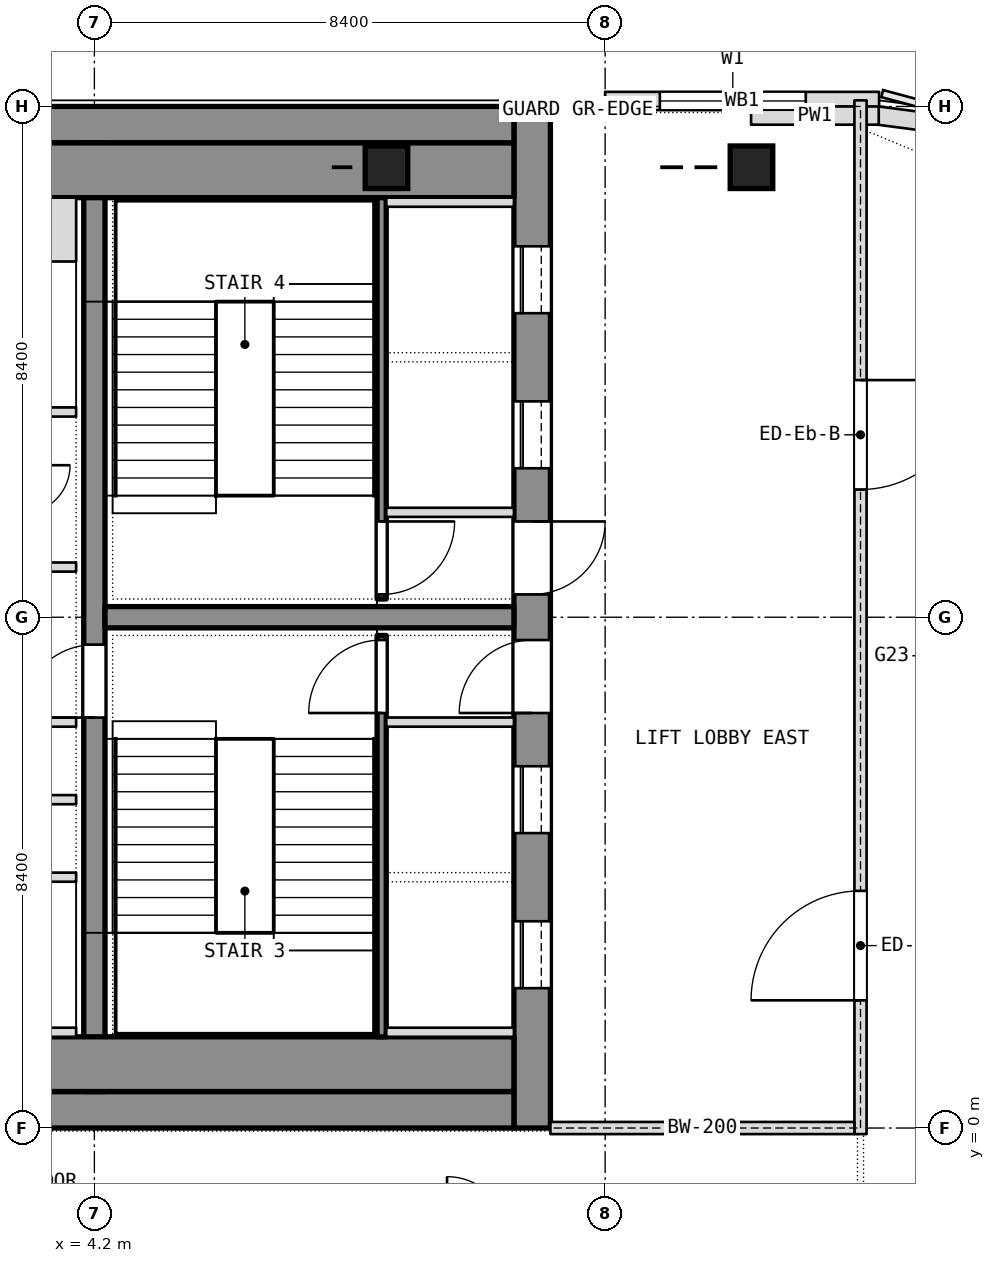
"""IFC4 building model, lengths in metres.
Left out: names, types, materials, properties, quantities, classifications, styles, units other than length and angle.
Written with IfcOpenShell. Run it as: python <this file> out.ifc"""

import sys

from ifc_helpers import new_model, si_unit, direction, frame, frame_2d, origin, place, context, subcontext, project, spatial, rectangle, extrude, element, fill, save


model = new_model("IFC4")
c1 = context("Model", 3, precision=1e-05, world=origin(), true_north=direction((0.0, 1.0)))
c2 = subcontext(c1, "Body", "Model", "MODEL_VIEW")
j1 = project(units=[si_unit("LENGTHUNIT", "METRE"), si_unit("PLANEANGLEUNIT", "RADIAN")], contexts=[c1])
p1 = place(None, origin())
s1 = spatial("IfcSite", under=j1, at=p1, CompositionType="ELEMENT")
p2 = place(p1, origin())
s2 = spatial("IfcBuilding", under=s1, at=p2, CompositionType="ELEMENT")
p3 = place(p2, frame((0.0, 0.0, 277.7)))
s3 = spatial("IfcBuildingStorey", under=s2, at=p3, CompositionType="ELEMENT", Elevation=277.7)
p4 = place(p3, frame((11.4, 0.0, 0.0), z_axis=(0.0, 0.0, 1.0), x_axis=(0.0, 1.0, 0.0)))
e1 = element("IfcWall", 1, at=p4, inside=s3, PredefinedType="SHEAR", context=c2, shape_type="SweptSolid", body=[
    extrude(rectangle(XDim=16.8, YDim=0.6, at=frame_2d((8.4, 0.0))), origin(), (0.0, 0.0, 1.0), 3.6),
])
p5 = place(p4, frame((2.3, 0.0, 0.0)))
e2 = element("IfcOpeningElement", 2, at=p5, cuts=e1, PredefinedType="OPENING", context=c2, shape_type="SweptSolid", body=[
    extrude(rectangle(XDim=1.1, YDim=2.1, at=frame_2d((0.55, 1.05))), frame((0.0, 0.3, 0.0), z_axis=(0.0, -1.0, 0.0), x_axis=(1.0, 0.0, 0.0)), (0.0, 0.0, 1.0), 0.6),
])
p6 = place(p4, frame((4.85, 0.0, 0.0)))
e3 = element("IfcOpeningElement", 3, at=p6, cuts=e1, PredefinedType="OPENING", context=c2, shape_type="SweptSolid", body=[
    extrude(rectangle(XDim=1.1, YDim=2.1, at=frame_2d((0.55, 1.05))), frame((0.0, 0.3, 0.0), z_axis=(0.0, -1.0, 0.0), x_axis=(1.0, 0.0, 0.0)), (0.0, 0.0, 1.0), 0.6),
])
p7 = place(p4, frame((6.825, 0.0, 0.0)))
e4 = element("IfcOpeningElement", 4, at=p7, cuts=e1, PredefinedType="OPENING", context=c2, shape_type="SweptSolid", body=[
    extrude(rectangle(XDim=1.2, YDim=2.1, at=frame_2d((0.6, 1.05))), frame((0.0, 0.3, 0.0), z_axis=(0.0, -1.0, 0.0), x_axis=(1.0, 0.0, 0.0)), (0.0, 0.0, 1.0), 0.6),
])
p8 = place(p4, frame((13.4, 0.0, 0.0)))
e5 = element("IfcOpeningElement", 5, at=p8, cuts=e1, PredefinedType="OPENING", context=c2, shape_type="SweptSolid", body=[
    extrude(rectangle(XDim=1.1, YDim=2.1, at=frame_2d((0.55, 1.05))), frame((0.0, 0.3, 0.0), z_axis=(0.0, -1.0, 0.0), x_axis=(1.0, 0.0, 0.0)), (0.0, 0.0, 1.0), 0.6),
])
p9 = place(p4, frame((10.85, 0.0, 0.0)))
e6 = element("IfcOpeningElement", 6, at=p9, cuts=e1, PredefinedType="OPENING", context=c2, shape_type="SweptSolid", body=[
    extrude(rectangle(XDim=1.1, YDim=2.1, at=frame_2d((0.55, 1.05))), frame((0.0, 0.3, 0.0), z_axis=(0.0, -1.0, 0.0), x_axis=(1.0, 0.0, 0.0)), (0.0, 0.0, 1.0), 0.6),
])
p10 = place(p4, frame((8.775, 0.0, 0.0)))
e7 = element("IfcOpeningElement", 7, at=p10, cuts=e1, PredefinedType="OPENING", context=c2, shape_type="SweptSolid", body=[
    extrude(rectangle(XDim=1.2, YDim=2.1, at=frame_2d((0.6, 1.05))), frame((0.0, 0.3, 0.0), z_axis=(0.0, -1.0, 0.0), x_axis=(1.0, 0.0, 0.0)), (0.0, 0.0, 1.0), 0.6),
])
for number, where, z_axis, x_axis in (
    (8, (-11.1, 0.3, 0.0), (0.0, 0.0, 1.0), (1.0, 0.0, 0.0)),
    (9, (-11.1, 16.5, 0.0), (0.0, 0.0, 1.0), (1.0, 0.0, 0.0)),
):
    element("IfcWall", number, at=place(p3, frame(where, z_axis=z_axis, x_axis=x_axis)), inside=s3, PredefinedType="SHEAR", context=c2, shape_type="SweptSolid", body=[
        extrude(rectangle(XDim=22.2, YDim=0.6, at=frame_2d((11.1, 0.0))), origin(), (0.0, 0.0, 1.0), 3.6),
    ])
p11 = place(p3, frame((4.2, 0.6, 0.0), z_axis=(0.0, 0.0, 1.0), x_axis=(0.0, 1.0, 0.0)))
e10 = element("IfcWall", 10, at=p11, inside=s3, PredefinedType="SHEAR", context=c2, shape_type="SweptSolid", body=[
    extrude(rectangle(XDim=15.6, YDim=0.35, at=frame_2d((7.8, 0.0))), origin(), (0.0, 0.0, 1.0), 3.6),
])
p12 = place(p11, frame((6.15, 0.0, 0.0)))
e11 = element("IfcOpeningElement", 11, at=p12, cuts=e10, PredefinedType="OPENING", context=c2, shape_type="SweptSolid", body=[
    extrude(rectangle(XDim=1.2, YDim=2.1, at=frame_2d((0.6, 1.05))), frame((0.0, 0.175, 0.0), z_axis=(0.0, -1.0, 0.0), x_axis=(1.0, 0.0, 0.0)), (0.0, 0.0, 1.0), 0.35),
])
p13 = place(p3, frame((4.375, 8.4, 0.0), z_axis=(0.0, 0.0, 1.0), x_axis=(1.0, 0.0, 0.0)))
e12 = element("IfcWall", 12, at=p13, inside=s3, PredefinedType="SHEAR", context=c2, shape_type="SweptSolid", body=[
    extrude(rectangle(XDim=6.725, YDim=0.35, at=frame_2d((3.363, 0.0))), origin(), (0.0, 0.0, 1.0), 3.6),
])
p14 = place(p3, frame((17.106, 16.89, 0.0), z_axis=(0.0, 0.0, 1.0), x_axis=(-1.0, 0.0, 0.0)))
e13 = element("IfcWall", 13, at=p14, inside=s3, PredefinedType="NOTDEFINED", context=c2, shape_type="SweptSolid", body=[
    extrude(rectangle(XDim=4.506, YDim=0.3, at=frame_2d((2.253, 0.0))), origin(), (0.0, 0.0, 1.0), 3.6),
])
p15 = place(p14, frame((1.206, 0.0, 0.9)))
e14 = element("IfcOpeningElement", 14, at=p15, cuts=e13, PredefinedType="OPENING", context=c2, shape_type="SweptSolid", body=[
    extrude(rectangle(XDim=2.4, YDim=2.1, at=frame_2d((1.2, 1.05))), frame((0.0, 0.15, 0.0), z_axis=(0.0, -1.0, 0.0), x_axis=(1.0, 0.0, 0.0)), (0.0, 0.0, 1.0), 0.3),
])
p16 = place(p3, frame((17.08, 16.651, 3.6), z_axis=(0.0, 0.0, 1.0), x_axis=(0.991453765022, -0.130458544462, 0.0)))
e15 = element("IfcWall", 15, at=p16, inside=s3, PredefinedType="PARAPET", context=c2, shape_type="SweptSolid", body=[
    extrude(rectangle(XDim=1.566, YDim=0.3, at=frame_2d((0.783, 0.0))), origin(), (0.0, 0.0, 1.0), 1.1),
])
p17 = place(p3, frame((15.0, 16.65, 3.6), z_axis=(0.0, 0.0, 1.0), x_axis=(1.0, 0.0, 0.0)))
e16 = element("IfcWall", 16, at=p17, inside=s3, PredefinedType="PARAPET", context=c2, shape_type="SweptSolid", body=[
    extrude(rectangle(XDim=2.1, YDim=0.3, at=frame_2d((1.05, 0.0))), origin(), (0.0, 0.0, 1.0), 1.1),
])
for number, where, z_axis, x_axis in (
    (17, (-11.1, 1.05, 0.0), (0.0, 0.0, 1.0), (1.0, 0.0, 0.0)),
    (18, (-11.1, 15.75, 0.0), (0.0, 0.0, 1.0), (1.0, 0.0, 0.0)),
):
    element("IfcWall", number, at=place(p3, frame(where, z_axis=z_axis, x_axis=x_axis)), inside=s3, PredefinedType="PARTITIONING", context=c2, shape_type="SweptSolid", body=[
        extrude(rectangle(XDim=22.2, YDim=0.9, at=frame_2d((11.1, 0.0))), origin(), (0.0, 0.0, 1.0), 3.34),
    ])
p18 = place(p3, frame((8.925, 1.5, 0.0), z_axis=(0.0, 0.0, 1.0), x_axis=(0.0, 1.0, 0.0)))
e19 = element("IfcWall", 19, at=p18, inside=s3, PredefinedType="SHEAR", context=c2, shape_type="SweptSolid", body=[
    extrude(rectangle(XDim=6.6, YDim=0.15, at=frame_2d((3.3, 0.0))), origin(), (0.0, 0.0, 1.0), 3.34),
])
p19 = place(p18, frame((5.325, 0.0, 0.0)))
e20 = element("IfcOpeningElement", 20, at=p19, cuts=e19, PredefinedType="OPENING", context=c2, shape_type="SweptSolid", body=[
    extrude(rectangle(XDim=1.2, YDim=2.1, at=frame_2d((0.6, 1.05))), frame((0.0, 0.075, 0.0), z_axis=(0.0, -1.0, 0.0), x_axis=(1.0, 0.0, 0.0)), (0.0, 0.0, 1.0), 0.15),
])
for number, where, z_axis, x_axis in (
    (21, (9.0, 6.675, 0.0), (0.0, 0.0, 1.0), (1.0, 0.0, 0.0)),
    (22, (9.0, 1.575, 0.0), (0.0, 0.0, 1.0), (1.0, 0.0, 0.0)),
):
    element("IfcWall", number, at=place(p3, frame(where, z_axis=z_axis, x_axis=x_axis)), inside=s3, PredefinedType="SHEAR", context=c2, shape_type="SweptSolid", body=[
        extrude(rectangle(XDim=2.1, YDim=0.15, at=frame_2d((1.05, 0.0))), origin(), (0.0, 0.0, 1.0), 3.6),
    ])
p20 = place(p3, frame((8.925, 8.7, 0.0), z_axis=(0.0, 0.0, 1.0), x_axis=(0.0, 1.0, 0.0)))
e23 = element("IfcWall", 23, at=p20, inside=s3, PredefinedType="SHEAR", context=c2, shape_type="SweptSolid", body=[
    extrude(rectangle(XDim=6.6, YDim=0.15, at=frame_2d((3.3, 0.0))), origin(), (0.0, 0.0, 1.0), 3.34),
])
p21 = place(p20, frame((0.075, 0.0, 0.0)))
e24 = element("IfcOpeningElement", 24, at=p21, cuts=e23, PredefinedType="OPENING", context=c2, shape_type="SweptSolid", body=[
    extrude(rectangle(XDim=1.2, YDim=2.1, at=frame_2d((0.6, 1.05))), frame((0.0, 0.075, 0.0), z_axis=(0.0, -1.0, 0.0), x_axis=(1.0, 0.0, 0.0)), (0.0, 0.0, 1.0), 0.15),
])
for number, where, z_axis, x_axis in (
    (25, (9.0, 10.125, 0.0), (0.0, 0.0, 1.0), (1.0, 0.0, 0.0)),
    (26, (9.0, 15.225, 0.0), (0.0, 0.0, 1.0), (1.0, 0.0, 0.0)),
):
    element("IfcWall", number, at=place(p3, frame(where, z_axis=z_axis, x_axis=x_axis)), inside=s3, PredefinedType="SHEAR", context=c2, shape_type="SweptSolid", body=[
        extrude(rectangle(XDim=2.1, YDim=0.15, at=frame_2d((1.05, 0.0))), origin(), (0.0, 0.0, 1.0), 3.6),
    ])
p22 = place(p3, frame((-3.9, 4.125, 0.0), z_axis=(0.0, 0.0, 1.0), x_axis=(1.0, 0.0, 0.0)))
e27 = element("IfcWall", 27, at=p22, inside=s3, PredefinedType="PARTITIONING", context=c2, shape_type="SweptSolid", body=[
    extrude(rectangle(XDim=7.8, YDim=0.15, at=frame_2d((3.9, 0.0))), origin(), (0.0, 0.0, 1.0), 3.34),
])
p23 = place(p22, frame((3.75, 0.0, 0.0)))
e28 = element("IfcOpeningElement", 28, at=p23, cuts=e27, PredefinedType="OPENING", context=c2, shape_type="SweptSolid", body=[
    extrude(rectangle(XDim=1.2, YDim=2.1, at=frame_2d((0.6, 1.05))), frame((0.0, 0.075, 0.0), z_axis=(0.0, -1.0, 0.0), x_axis=(1.0, 0.0, 0.0)), (0.0, 0.0, 1.0), 0.15),
])
p24 = place(p3, frame((-3.9, 11.775, 0.0), z_axis=(0.0, 0.0, 1.0), x_axis=(1.0, 0.0, 0.0)))
e29 = element("IfcWall", 29, at=p24, inside=s3, PredefinedType="PARTITIONING", context=c2, shape_type="SweptSolid", body=[
    extrude(rectangle(XDim=7.8, YDim=0.15, at=frame_2d((3.9, 0.0))), origin(), (0.0, 0.0, 1.0), 3.34),
])
p25 = place(p24, frame((3.3, 0.0, 0.0)))
e30 = element("IfcOpeningElement", 30, at=p25, cuts=e29, PredefinedType="OPENING", context=c2, shape_type="SweptSolid", body=[
    extrude(rectangle(XDim=1.2, YDim=2.1, at=frame_2d((0.6, 1.05))), frame((0.0, 0.075, 0.0), z_axis=(0.0, -1.0, 0.0), x_axis=(1.0, 0.0, 0.0)), (0.0, 0.0, 1.0), 0.15),
])
p26 = place(p3, frame((1.65, 1.575, 0.0), z_axis=(0.0, 0.0, 1.0), x_axis=(1.0, 0.0, 0.0)))
e31 = element("IfcWall", 31, at=p26, inside=s3, PredefinedType="SHEAR", context=c2, shape_type="SweptSolid", body=[
    extrude(rectangle(XDim=2.25, YDim=0.15, at=frame_2d((1.125, 0.0))), origin(), (0.0, 0.0, 1.0), 3.6),
])
p27 = place(p3, frame((1.65, 14.775, 0.0), z_axis=(0.0, 0.0, 1.0), x_axis=(1.0, 0.0, 0.0)))
e32 = element("IfcWall", 32, at=p27, inside=s3, PredefinedType="SHEAR", context=c2, shape_type="SweptSolid", body=[
    extrude(rectangle(XDim=2.25, YDim=1.05, at=frame_2d((1.125, 0.0))), origin(), (0.0, 0.0, 1.0), 3.6),
])
for number, where, z_axis, x_axis in (
    (33, (1.65, 6.675, 0.0), (0.0, 0.0, 1.0), (1.0, 0.0, 0.0)),
    (34, (1.65, 9.225, 0.0), (0.0, 0.0, 1.0), (1.0, 0.0, 0.0)),
):
    element("IfcWall", number, at=place(p3, frame(where, z_axis=z_axis, x_axis=x_axis)), inside=s3, PredefinedType="PARTITIONING", context=c2, shape_type="SweptSolid", body=[
        extrude(rectangle(XDim=2.25, YDim=0.15, at=frame_2d((1.125, 0.0))), origin(), (0.0, 0.0, 1.0), 3.34),
    ])
p28 = place(p3, frame((1.8, 5.4, 0.0), z_axis=(0.0, 0.0, 1.0), x_axis=(1.0, 0.0, 0.0)))
e35 = element("IfcWall", 35, at=p28, inside=s3, PredefinedType="PARTITIONING", context=c2, shape_type="SweptSolid", body=[
    extrude(rectangle(XDim=2.1, YDim=0.15, at=frame_2d((1.05, 0.0))), origin(), (0.0, 0.0, 1.0), 3.34),
])
p29 = place(p3, frame((16.8, -0.1, 0.0), z_axis=(0.0, 0.0, 1.0), x_axis=(0.0, 1.0, 0.0)))
e36 = element("IfcWall", 36, at=p29, inside=s3, PredefinedType="PARTITIONING", context=c2, shape_type="SweptSolid", body=[
    extrude(rectangle(XDim=17.0, YDim=0.2, at=frame_2d((8.5, 0.0))), origin(), (0.0, 0.0, 1.0), 3.34),
])
p30 = place(p29, frame((2.2, 0.0, 0.0)))
e37 = element("IfcOpeningElement", 37, at=p30, cuts=e36, PredefinedType="OPENING", context=c2, shape_type="SweptSolid", body=[
    extrude(rectangle(XDim=1.8, YDim=2.1, at=frame_2d((0.9, 1.05))), frame((0.0, 0.1, 0.0), z_axis=(0.0, -1.0, 0.0), x_axis=(1.0, 0.0, 0.0)), (0.0, 0.0, 1.0), 0.2),
])
p31 = place(p29, frame((10.6, 0.0, 0.0)))
e38 = element("IfcOpeningElement", 38, at=p31, cuts=e36, PredefinedType="OPENING", context=c2, shape_type="SweptSolid", body=[
    extrude(rectangle(XDim=1.8, YDim=2.1, at=frame_2d((0.9, 1.05))), frame((0.0, 0.1, 0.0), z_axis=(0.0, -1.0, 0.0), x_axis=(1.0, 0.0, 0.0)), (0.0, 0.0, 1.0), 0.2),
])
p32 = place(p3, frame((11.7, 0.0, 0.0), z_axis=(0.0, 0.0, 1.0), x_axis=(1.0, 0.0, 0.0)))
e39 = element("IfcWall", 39, at=p32, inside=s3, PredefinedType="PARTITIONING", context=c2, shape_type="SweptSolid", body=[
    extrude(rectangle(XDim=5.0, YDim=0.2, at=frame_2d((2.5, 0.0))), origin(), (0.0, 0.0, 1.0), 3.0),
])
p33 = place(p15, origin())
e40 = element("IfcWindow", 40, at=p33, inside=s3, PartitioningType="SINGLE_PANEL", PredefinedType="WINDOW", context=c2, shape_type="SweptSolid", body=[
    extrude(rectangle(XDim=2.4, YDim=2.1, at=frame_2d((1.2, 1.05))), frame((0.0, 0.03, 0.0), z_axis=(0.0, -1.0, 0.0), x_axis=(1.0, 0.0, 0.0)), (0.0, 0.0, 1.0), 0.06),
])
fill(e14, e40)
p34 = place(p5, origin())
e41 = element("IfcDoor", 41, at=p34, inside=s3, OperationType="SLIDING_TO_LEFT", PredefinedType="DOOR", context=c2, shape_type="SweptSolid", body=[
    extrude(rectangle(XDim=1.1, YDim=2.1, at=frame_2d((0.55, 1.05))), frame((0.0, 0.025, 0.0), z_axis=(0.0, -1.0, 0.0), x_axis=(1.0, 0.0, 0.0)), (0.0, 0.0, 1.0), 0.05),
])
fill(e2, e41)
p35 = place(p6, origin())
e42 = element("IfcDoor", 42, at=p35, inside=s3, OperationType="SLIDING_TO_LEFT", PredefinedType="DOOR", context=c2, shape_type="SweptSolid", body=[
    extrude(rectangle(XDim=1.1, YDim=2.1, at=frame_2d((0.55, 1.05))), frame((0.0, 0.025, 0.0), z_axis=(0.0, -1.0, 0.0), x_axis=(1.0, 0.0, 0.0)), (0.0, 0.0, 1.0), 0.05),
])
fill(e3, e42)
p36 = place(p7, origin())
e43 = element("IfcDoor", 43, at=p36, inside=s3, OperationType="SINGLE_SWING_LEFT", PredefinedType="DOOR", context=c2, shape_type="SweptSolid", body=[
    extrude(rectangle(XDim=1.2, YDim=2.1, at=frame_2d((0.6, 1.05))), frame((0.0, 0.025, 0.0), z_axis=(0.0, -1.0, 0.0), x_axis=(1.0, 0.0, 0.0)), (0.0, 0.0, 1.0), 0.05),
])
fill(e4, e43)
p37 = place(p19, origin())
e44 = element("IfcDoor", 44, at=p37, inside=s3, OperationType="SINGLE_SWING_LEFT", PredefinedType="DOOR", context=c2, shape_type="SweptSolid", body=[
    extrude(rectangle(XDim=1.2, YDim=2.1, at=frame_2d((0.6, 1.05))), frame((0.0, 0.025, 0.0), z_axis=(0.0, -1.0, 0.0), x_axis=(1.0, 0.0, 0.0)), (0.0, 0.0, 1.0), 0.05),
])
fill(e20, e44)
p38 = place(p8, origin())
e45 = element("IfcDoor", 45, at=p38, inside=s3, OperationType="SLIDING_TO_LEFT", PredefinedType="DOOR", context=c2, shape_type="SweptSolid", body=[
    extrude(rectangle(XDim=1.1, YDim=2.1, at=frame_2d((0.55, 1.05))), frame((0.0, 0.025, 0.0), z_axis=(0.0, -1.0, 0.0), x_axis=(1.0, 0.0, 0.0)), (0.0, 0.0, 1.0), 0.05),
])
fill(e5, e45)
p39 = place(p9, origin())
e46 = element("IfcDoor", 46, at=p39, inside=s3, OperationType="SLIDING_TO_LEFT", PredefinedType="DOOR", context=c2, shape_type="SweptSolid", body=[
    extrude(rectangle(XDim=1.1, YDim=2.1, at=frame_2d((0.55, 1.05))), frame((0.0, 0.025, 0.0), z_axis=(0.0, -1.0, 0.0), x_axis=(1.0, 0.0, 0.0)), (0.0, 0.0, 1.0), 0.05),
])
fill(e6, e46)
p40 = place(p10, origin())
e47 = element("IfcDoor", 47, at=p40, inside=s3, OperationType="SINGLE_SWING_LEFT", PredefinedType="DOOR", context=c2, shape_type="SweptSolid", body=[
    extrude(rectangle(XDim=1.2, YDim=2.1, at=frame_2d((0.6, 1.05))), frame((0.0, 0.025, 0.0), z_axis=(0.0, -1.0, 0.0), x_axis=(1.0, 0.0, 0.0)), (0.0, 0.0, 1.0), 0.05),
])
fill(e7, e47)
p41 = place(p21, origin())
e48 = element("IfcDoor", 48, at=p41, inside=s3, OperationType="SINGLE_SWING_LEFT", PredefinedType="DOOR", context=c2, shape_type="SweptSolid", body=[
    extrude(rectangle(XDim=1.2, YDim=2.1, at=frame_2d((0.6, 1.05))), frame((0.0, 0.025, 0.0), z_axis=(0.0, -1.0, 0.0), x_axis=(1.0, 0.0, 0.0)), (0.0, 0.0, 1.0), 0.05),
])
fill(e24, e48)
p42 = place(p12, origin())
e49 = element("IfcDoor", 49, at=p42, inside=s3, OperationType="SINGLE_SWING_LEFT", PredefinedType="DOOR", context=c2, shape_type="SweptSolid", body=[
    extrude(rectangle(XDim=1.2, YDim=2.1, at=frame_2d((0.6, 1.05))), frame((0.0, 0.025, 0.0), z_axis=(0.0, -1.0, 0.0), x_axis=(1.0, 0.0, 0.0)), (0.0, 0.0, 1.0), 0.05),
])
fill(e11, e49)
p43 = place(p30, origin())
e50 = element("IfcDoor", 50, at=p43, inside=s3, OperationType="DOUBLE_DOOR_SINGLE_SWING", PredefinedType="DOOR", context=c2, shape_type="SweptSolid", body=[
    extrude(rectangle(XDim=1.8, YDim=2.1, at=frame_2d((0.9, 1.05))), frame((0.0, 0.025, 0.0), z_axis=(0.0, -1.0, 0.0), x_axis=(1.0, 0.0, 0.0)), (0.0, 0.0, 1.0), 0.05),
])
fill(e37, e50)
p44 = place(p31, origin())
e51 = element("IfcDoor", 51, at=p44, inside=s3, OperationType="DOUBLE_DOOR_SINGLE_SWING", PredefinedType="DOOR", context=c2, shape_type="SweptSolid", body=[
    extrude(rectangle(XDim=1.8, YDim=2.1, at=frame_2d((0.9, 1.05))), frame((0.0, 0.025, 0.0), z_axis=(0.0, -1.0, 0.0), x_axis=(1.0, 0.0, 0.0)), (0.0, 0.0, 1.0), 0.05),
])
fill(e38, e51)
save(model, sys.argv[1])
